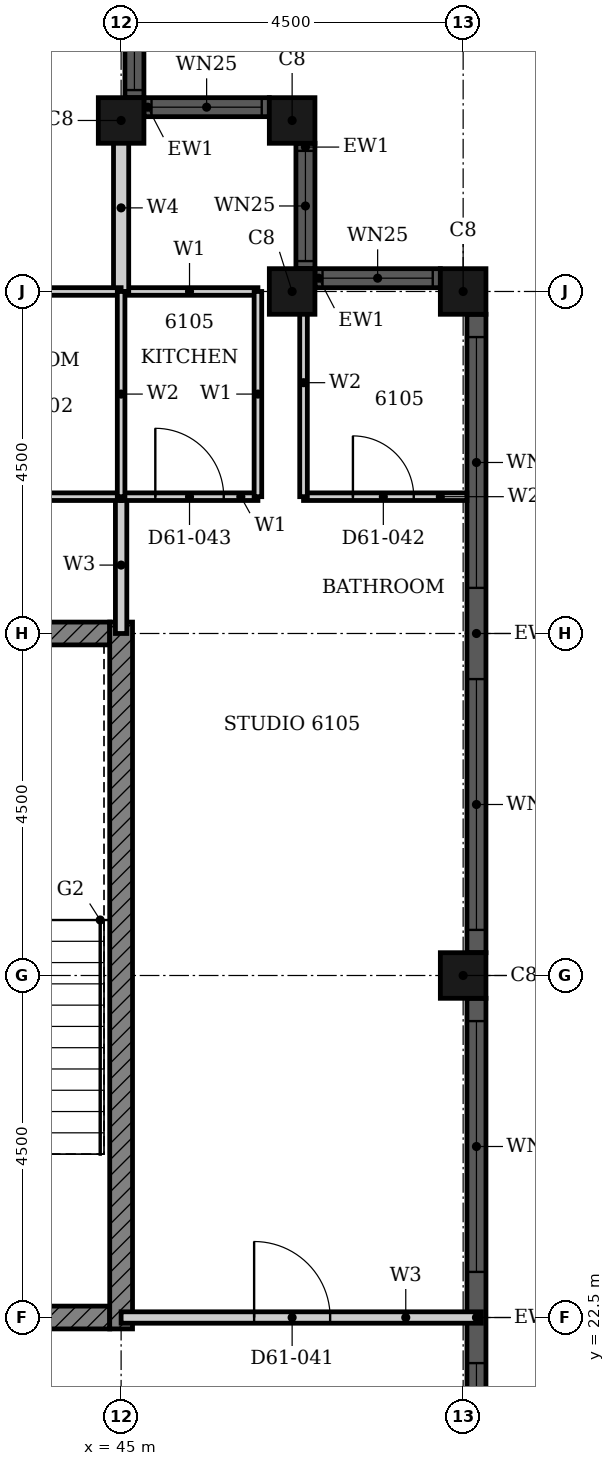
"""IFC4 building model, lengths in metres.
Left out: names, types, materials, properties, quantities, classifications, styles, units other than length and angle.
Written with IfcOpenShell. Run it as: python <this file> out.ifc"""

import sys

from ifc_helpers import new_model, si_unit, direction, frame, frame_2d, origin, origin_2d, place, context, subcontext, project, spatial, rectangle, hollow_rectangle, extrude, element, fill, save


model = new_model("IFC4")
c1 = context("Model", 3, precision=1e-05, world=origin(), true_north=direction((0.0, 1.0)))
c2 = subcontext(c1, "Body", "Model", "MODEL_VIEW")
j1 = project(units=[si_unit("LENGTHUNIT", "METRE"), si_unit("PLANEANGLEUNIT", "RADIAN")], contexts=[c1])
p1 = place(None, origin())
s1 = spatial("IfcSite", under=j1, at=p1, CompositionType="ELEMENT")
p2 = place(p1, origin())
s2 = spatial("IfcBuilding", under=s1, at=p2, CompositionType="ELEMENT")
p3 = place(p2, frame((0.0, 0.0, 241.6)))
s3 = spatial("IfcBuildingStorey", under=s2, at=p3, CompositionType="ELEMENT", Elevation=241.6)
for number, where, z_axis, x_axis in (
    (1, (49.5, 27.0, 0.0), (0.0, 0.0, 1.0), (1.0, 0.0, 0.0)),
    (2, (49.5, 36.0, 0.0), (0.0, 0.0, 1.0), (1.0, 0.0, 0.0)),
    (3, (47.25, 36.0, 0.0), (0.0, 0.0, 1.0), (1.0, 0.0, 0.0)),
    (4, (47.25, 38.25, 0.0), (0.0, 0.0, 1.0), (1.0, 0.0, 0.0)),
    (5, (45.0, 38.25, 0.0), (0.0, 0.0, 1.0), (1.0, 0.0, 0.0)),
):
    element("IfcColumn", number, at=place(p3, frame(where, z_axis=z_axis, x_axis=x_axis)), inside=s3, PredefinedType="COLUMN", context=c2, shape_type="SweptSolid", body=[
        extrude(hollow_rectangle(XDim=0.6, YDim=0.6, WallThickness=0.02, at=origin_2d()), origin(), (0.0, 0.0, 1.0), 3.7),
    ])
p4 = place(p3, frame((49.675, 18.3, 0.0), z_axis=(0.0, 0.0, 1.0), x_axis=(0.0, 1.0, 0.0)))
e6 = element("IfcWall", 6, at=p4, inside=s3, PredefinedType="SOLIDWALL", context=c2, shape_type="SweptSolid", body=[
    extrude(rectangle(XDim=8.4, YDim=0.25, at=frame_2d((4.2, 0.0))), origin(), (0.0, 0.0, 1.0), 3.7),
])
p5 = place(p4, frame((0.3, 0.0, 0.45)))
e7 = element("IfcOpeningElement", 7, at=p5, cuts=e6, PredefinedType="OPENING", context=c2, shape_type="SweptSolid", body=[
    extrude(rectangle(XDim=3.3, YDim=2.3, at=frame_2d((1.65, 1.15))), frame((0.0, 0.135, 0.0), z_axis=(0.0, -1.0, 0.0), x_axis=(1.0, 0.0, 0.0)), (0.0, 0.0, 1.0), 0.27),
])
p6 = place(p4, frame((4.8, 0.0, 0.45)))
e8 = element("IfcOpeningElement", 8, at=p6, cuts=e6, PredefinedType="OPENING", context=c2, shape_type="SweptSolid", body=[
    extrude(rectangle(XDim=3.3, YDim=2.3, at=frame_2d((1.65, 1.15))), frame((0.0, 0.135, 0.0), z_axis=(0.0, -1.0, 0.0), x_axis=(1.0, 0.0, 0.0)), (0.0, 0.0, 1.0), 0.27),
])
p7 = place(p3, frame((49.675, 27.3, 0.0), z_axis=(0.0, 0.0, 1.0), x_axis=(0.0, 1.0, 0.0)))
e9 = element("IfcWall", 9, at=p7, inside=s3, PredefinedType="SOLIDWALL", context=c2, shape_type="SweptSolid", body=[
    extrude(rectangle(XDim=8.4, YDim=0.25, at=frame_2d((4.2, 0.0))), origin(), (0.0, 0.0, 1.0), 3.7),
])
p8 = place(p7, frame((0.3, 0.0, 0.45)))
e10 = element("IfcOpeningElement", 10, at=p8, cuts=e9, PredefinedType="OPENING", context=c2, shape_type="SweptSolid", body=[
    extrude(rectangle(XDim=3.3, YDim=2.3, at=frame_2d((1.65, 1.15))), frame((0.0, 0.135, 0.0), z_axis=(0.0, -1.0, 0.0), x_axis=(1.0, 0.0, 0.0)), (0.0, 0.0, 1.0), 0.27),
])
p9 = place(p7, frame((4.8, 0.0, 0.45)))
e11 = element("IfcOpeningElement", 11, at=p9, cuts=e9, PredefinedType="OPENING", context=c2, shape_type="SweptSolid", body=[
    extrude(rectangle(XDim=3.3, YDim=2.3, at=frame_2d((1.65, 1.15))), frame((0.0, 0.135, 0.0), z_axis=(0.0, -1.0, 0.0), x_axis=(1.0, 0.0, 0.0)), (0.0, 0.0, 1.0), 0.27),
])
p10 = place(p3, frame((49.2, 36.175, 0.0), z_axis=(0.0, 0.0, 1.0), x_axis=(-1.0, 0.0, 0.0)))
e12 = element("IfcWall", 12, at=p10, inside=s3, PredefinedType="SOLIDWALL", context=c2, shape_type="SweptSolid", body=[
    extrude(rectangle(XDim=1.65, YDim=0.25, at=frame_2d((0.825, 0.0))), origin(), (0.0, 0.0, 1.0), 3.7),
])
p11 = place(p10, frame((0.1, 0.0, 0.9)))
e13 = element("IfcOpeningElement", 13, at=p11, cuts=e12, PredefinedType="OPENING", context=c2, shape_type="SweptSolid", body=[
    extrude(rectangle(XDim=1.45, YDim=1.85, at=frame_2d((0.725, 0.925))), frame((0.0, 0.135, 0.0), z_axis=(0.0, -1.0, 0.0), x_axis=(1.0, 0.0, 0.0)), (0.0, 0.0, 1.0), 0.27),
])
p12 = place(p3, frame((47.425, 36.3, 0.0), z_axis=(0.0, 0.0, 1.0), x_axis=(0.0, 1.0, 0.0)))
e14 = element("IfcWall", 14, at=p12, inside=s3, PredefinedType="SOLIDWALL", context=c2, shape_type="SweptSolid", body=[
    extrude(rectangle(XDim=1.65, YDim=0.25, at=frame_2d((0.825, 0.0))), origin(), (0.0, 0.0, 1.0), 3.7),
])
p13 = place(p12, frame((0.1, 0.0, 0.9)))
e15 = element("IfcOpeningElement", 15, at=p13, cuts=e14, PredefinedType="OPENING", context=c2, shape_type="SweptSolid", body=[
    extrude(rectangle(XDim=1.45, YDim=1.85, at=frame_2d((0.725, 0.925))), frame((0.0, 0.135, 0.0), z_axis=(0.0, -1.0, 0.0), x_axis=(1.0, 0.0, 0.0)), (0.0, 0.0, 1.0), 0.27),
])
p14 = place(p3, frame((46.95, 38.425, 0.0), z_axis=(0.0, 0.0, 1.0), x_axis=(-1.0, 0.0, 0.0)))
e16 = element("IfcWall", 16, at=p14, inside=s3, PredefinedType="SOLIDWALL", context=c2, shape_type="SweptSolid", body=[
    extrude(rectangle(XDim=1.65, YDim=0.25, at=frame_2d((0.825, 0.0))), origin(), (0.0, 0.0, 1.0), 3.7),
])
p15 = place(p14, frame((0.1, 0.0, 0.9)))
e17 = element("IfcOpeningElement", 17, at=p15, cuts=e16, PredefinedType="OPENING", context=c2, shape_type="SweptSolid", body=[
    extrude(rectangle(XDim=1.45, YDim=1.85, at=frame_2d((0.725, 0.925))), frame((0.0, 0.135, 0.0), z_axis=(0.0, -1.0, 0.0), x_axis=(1.0, 0.0, 0.0)), (0.0, 0.0, 1.0), 0.27),
])
p16 = place(p3, frame((45.175, 38.55, 0.0), z_axis=(0.0, 0.0, 1.0), x_axis=(0.0, 1.0, 0.0)))
e18 = element("IfcWall", 18, at=p16, inside=s3, PredefinedType="SOLIDWALL", context=c2, shape_type="SweptSolid", body=[
    extrude(rectangle(XDim=1.65, YDim=0.25, at=frame_2d((0.825, 0.0))), origin(), (0.0, 0.0, 1.0), 3.7),
])
p17 = place(p16, frame((0.1, 0.0, 0.9)))
e19 = element("IfcOpeningElement", 19, at=p17, cuts=e18, PredefinedType="OPENING", context=c2, shape_type="SweptSolid", body=[
    extrude(rectangle(XDim=1.45, YDim=1.85, at=frame_2d((0.725, 0.925))), frame((0.0, 0.135, 0.0), z_axis=(0.0, -1.0, 0.0), x_axis=(1.0, 0.0, 0.0)), (0.0, 0.0, 1.0), 0.27),
])
p18 = place(p3, frame((30.339, 22.5, 0.0), z_axis=(0.0, 0.0, 1.0), x_axis=(1.0, 0.0, 0.0)))
e20 = element("IfcWall", 20, at=p18, inside=s3, PredefinedType="SHEAR", context=c2, shape_type="SweptSolid", body=[
    extrude(rectangle(XDim=14.511, YDim=0.3, at=frame_2d((7.255, 0.0))), origin(), (0.0, 0.0, 1.0), 3.4),
])
p19 = place(p18, frame((7.975, 0.0, 0.0)))
e21 = element("IfcOpeningElement", 21, at=p19, cuts=e20, PredefinedType="OPENING", context=c2, shape_type="SweptSolid", body=[
    extrude(rectangle(XDim=1.8, YDim=2.1, at=frame_2d((0.9, 1.05))), frame((0.0, 0.16, 0.0), z_axis=(0.0, -1.0, 0.0), x_axis=(1.0, 0.0, 0.0)), (0.0, 0.0, 1.0), 0.32),
])
p20 = place(p3, frame((40.625, 31.5, 0.0), z_axis=(0.0, 0.0, 1.0), x_axis=(1.0, 0.0, 0.0)))
e22 = element("IfcWall", 22, at=p20, inside=s3, PredefinedType="SHEAR", context=c2, shape_type="SweptSolid", body=[
    extrude(rectangle(XDim=4.225, YDim=0.3, at=frame_2d((2.113, 0.0))), origin(), (0.0, 0.0, 1.0), 3.4),
])
p21 = place(p3, frame((45.0, 22.35, 0.0), z_axis=(0.0, 0.0, 1.0), x_axis=(0.0, 1.0, 0.0)))
e23 = element("IfcWall", 23, at=p21, inside=s3, PredefinedType="SHEAR", context=c2, shape_type="SweptSolid", body=[
    extrude(rectangle(XDim=9.3, YDim=0.3, at=frame_2d((4.65, 0.0))), origin(), (0.0, 0.0, 1.0), 3.4),
])
p22 = place(p3, frame((45.0, 22.5, 0.0), z_axis=(0.0, 0.0, 1.0), x_axis=(1.0, 0.0, 0.0)))
e24 = element("IfcWall", 24, at=p22, inside=s3, PredefinedType="PARTITIONING", context=c2, shape_type="SweptSolid", body=[
    extrude(rectangle(XDim=4.74, YDim=0.15, at=frame_2d((2.37, 0.0))), origin(), (0.0, 0.0, 1.0), 3.4),
])
p23 = place(p22, frame((1.75, 0.0, 0.0)))
e25 = element("IfcOpeningElement", 25, at=p23, cuts=e24, PredefinedType="OPENING", context=c2, shape_type="SweptSolid", body=[
    extrude(rectangle(XDim=1.0, YDim=2.2, at=frame_2d((0.5, 1.1))), frame((0.0, 0.085, 0.0), z_axis=(0.0, -1.0, 0.0), x_axis=(1.0, 0.0, 0.0)), (0.0, 0.0, 1.0), 0.17),
])
p24 = place(p3, frame((45.0, 31.5, 0.0), z_axis=(0.0, 0.0, 1.0), x_axis=(0.0, 1.0, 0.0)))
e26 = element("IfcWall", 26, at=p24, inside=s3, PredefinedType="PARTITIONING", context=c2, shape_type="SweptSolid", body=[
    extrude(rectangle(XDim=1.8, YDim=0.15, at=frame_2d((0.9, 0.0))), origin(), (0.0, 0.0, 1.0), 3.4),
])
p25 = place(p3, frame((45.0, 33.3, 0.0), z_axis=(0.0, 0.0, 1.0), x_axis=(1.0, 0.0, 0.0)))
e27 = element("IfcWall", 27, at=p25, inside=s3, PredefinedType="PARTITIONING", context=c2, shape_type="SweptSolid", body=[
    extrude(rectangle(XDim=1.8, YDim=0.1, at=frame_2d((0.9, 0.0))), origin(), (0.0, 0.0, 1.0), 3.4),
])
p26 = place(p25, frame((0.45, 0.0, 0.0)))
e28 = element("IfcOpeningElement", 28, at=p26, cuts=e27, PredefinedType="OPENING", context=c2, shape_type="SweptSolid", body=[
    extrude(rectangle(XDim=0.9, YDim=2.1, at=frame_2d((0.45, 1.05))), frame((0.0, 0.06, 0.0), z_axis=(0.0, -1.0, 0.0), x_axis=(1.0, 0.0, 0.0)), (0.0, 0.0, 1.0), 0.12),
])
p27 = place(p3, frame((45.0, 36.0, 0.0), z_axis=(0.0, 0.0, 1.0), x_axis=(1.0, 0.0, 0.0)))
e29 = element("IfcWall", 29, at=p27, inside=s3, PredefinedType="PARTITIONING", context=c2, shape_type="SweptSolid", body=[
    extrude(rectangle(XDim=1.8, YDim=0.1, at=frame_2d((0.9, 0.0))), origin(), (0.0, 0.0, 1.0), 3.4),
])
p28 = place(p3, frame((46.8, 33.3, 0.0), z_axis=(0.0, 0.0, 1.0), x_axis=(0.0, 1.0, 0.0)))
e30 = element("IfcWall", 30, at=p28, inside=s3, PredefinedType="PARTITIONING", context=c2, shape_type="SweptSolid", body=[
    extrude(rectangle(XDim=2.7, YDim=0.1, at=frame_2d((1.35, 0.0))), origin(), (0.0, 0.0, 1.0), 3.4),
])
p29 = place(p3, frame((45.0, 36.0, 0.0), z_axis=(0.0, 0.0, 1.0), x_axis=(0.0, 1.0, 0.0)))
e31 = element("IfcWall", 31, at=p29, inside=s3, PredefinedType="PARTITIONING", context=c2, shape_type="SweptSolid", body=[
    extrude(rectangle(XDim=2.2, YDim=0.2, at=frame_2d((1.1, 0.0))), origin(), (0.0, 0.0, 1.0), 3.4),
])
p30 = place(p3, frame((42.0, 33.3, 0.0), z_axis=(0.0, 0.0, 1.0), x_axis=(1.0, 0.0, 0.0)))
e32 = element("IfcWall", 32, at=p30, inside=s3, PredefinedType="PARTITIONING", context=c2, shape_type="SweptSolid", body=[
    extrude(rectangle(XDim=3.0, YDim=0.1, at=frame_2d((1.5, 0.0))), origin(), (0.0, 0.0, 1.0), 3.4),
])
p31 = place(p3, frame((47.4, 33.3, 0.0), z_axis=(0.0, 0.0, 1.0), x_axis=(1.0, 0.0, 0.0)))
e33 = element("IfcWall", 33, at=p31, inside=s3, PredefinedType="PARTITIONING", context=c2, shape_type="SweptSolid", body=[
    extrude(rectangle(XDim=2.15, YDim=0.1, at=frame_2d((1.075, 0.0))), origin(), (0.0, 0.0, 1.0), 3.4),
])
p32 = place(p31, frame((0.65, 0.0, 0.0)))
e34 = element("IfcOpeningElement", 34, at=p32, cuts=e33, PredefinedType="OPENING", context=c2, shape_type="SweptSolid", body=[
    extrude(rectangle(XDim=0.8, YDim=2.1, at=frame_2d((0.4, 1.05))), frame((0.0, 0.06, 0.0), z_axis=(0.0, -1.0, 0.0), x_axis=(1.0, 0.0, 0.0)), (0.0, 0.0, 1.0), 0.12),
])
p33 = place(p3, frame((42.0, 36.0, 0.0), z_axis=(0.0, 0.0, 1.0), x_axis=(1.0, 0.0, 0.0)))
e35 = element("IfcWall", 35, at=p33, inside=s3, PredefinedType="PARTITIONING", context=c2, shape_type="SweptSolid", body=[
    extrude(rectangle(XDim=3.0, YDim=0.1, at=frame_2d((1.5, 0.0))), origin(), (0.0, 0.0, 1.0), 3.4),
])
p34 = place(p3, frame((45.0, 33.3, 0.0), z_axis=(0.0, 0.0, 1.0), x_axis=(0.0, 1.0, 0.0)))
e36 = element("IfcWall", 36, at=p34, inside=s3, PredefinedType="PARTITIONING", context=c2, shape_type="SweptSolid", body=[
    extrude(rectangle(XDim=2.7, YDim=0.1, at=frame_2d((1.35, 0.0))), origin(), (0.0, 0.0, 1.0), 3.4),
])
p35 = place(p3, frame((47.4, 33.3, 0.0), z_axis=(0.0, 0.0, 1.0), x_axis=(0.0, 1.0, 0.0)))
e37 = element("IfcWall", 37, at=p35, inside=s3, PredefinedType="PARTITIONING", context=c2, shape_type="SweptSolid", body=[
    extrude(rectangle(XDim=3.0, YDim=0.1, at=frame_2d((1.5, 0.0))), origin(), (0.0, 0.0, 1.0), 3.4),
])
p36 = place(p5, origin())
e38 = element("IfcWindow", 38, at=p36, inside=s3, PartitioningType="SINGLE_PANEL", PredefinedType="WINDOW", context=c2, shape_type="SweptSolid", body=[
    extrude(rectangle(XDim=3.3, YDim=2.3, at=frame_2d((1.65, 1.15))), frame((0.0, 0.03, 0.0), z_axis=(0.0, -1.0, 0.0), x_axis=(1.0, 0.0, 0.0)), (0.0, 0.0, 1.0), 0.06),
])
fill(e7, e38)
p37 = place(p6, origin())
e39 = element("IfcWindow", 39, at=p37, inside=s3, PartitioningType="SINGLE_PANEL", PredefinedType="WINDOW", context=c2, shape_type="SweptSolid", body=[
    extrude(rectangle(XDim=3.3, YDim=2.3, at=frame_2d((1.65, 1.15))), frame((0.0, 0.03, 0.0), z_axis=(0.0, -1.0, 0.0), x_axis=(1.0, 0.0, 0.0)), (0.0, 0.0, 1.0), 0.06),
])
fill(e8, e39)
p38 = place(p8, origin())
e40 = element("IfcWindow", 40, at=p38, inside=s3, PartitioningType="SINGLE_PANEL", PredefinedType="WINDOW", context=c2, shape_type="SweptSolid", body=[
    extrude(rectangle(XDim=3.3, YDim=2.3, at=frame_2d((1.65, 1.15))), frame((0.0, 0.03, 0.0), z_axis=(0.0, -1.0, 0.0), x_axis=(1.0, 0.0, 0.0)), (0.0, 0.0, 1.0), 0.06),
])
fill(e10, e40)
p39 = place(p9, origin())
e41 = element("IfcWindow", 41, at=p39, inside=s3, PartitioningType="SINGLE_PANEL", PredefinedType="WINDOW", context=c2, shape_type="SweptSolid", body=[
    extrude(rectangle(XDim=3.3, YDim=2.3, at=frame_2d((1.65, 1.15))), frame((0.0, 0.03, 0.0), z_axis=(0.0, -1.0, 0.0), x_axis=(1.0, 0.0, 0.0)), (0.0, 0.0, 1.0), 0.06),
])
fill(e11, e41)
p40 = place(p11, origin())
e42 = element("IfcWindow", 42, at=p40, inside=s3, PartitioningType="SINGLE_PANEL", PredefinedType="WINDOW", context=c2, shape_type="SweptSolid", body=[
    extrude(rectangle(XDim=1.45, YDim=1.85, at=frame_2d((0.725, 0.925))), frame((0.0, 0.03, 0.0), z_axis=(0.0, -1.0, 0.0), x_axis=(1.0, 0.0, 0.0)), (0.0, 0.0, 1.0), 0.06),
])
fill(e13, e42)
p41 = place(p13, origin())
e43 = element("IfcWindow", 43, at=p41, inside=s3, PartitioningType="SINGLE_PANEL", PredefinedType="WINDOW", context=c2, shape_type="SweptSolid", body=[
    extrude(rectangle(XDim=1.45, YDim=1.85, at=frame_2d((0.725, 0.925))), frame((0.0, 0.03, 0.0), z_axis=(0.0, -1.0, 0.0), x_axis=(1.0, 0.0, 0.0)), (0.0, 0.0, 1.0), 0.06),
])
fill(e15, e43)
p42 = place(p15, origin())
e44 = element("IfcWindow", 44, at=p42, inside=s3, PartitioningType="SINGLE_PANEL", PredefinedType="WINDOW", context=c2, shape_type="SweptSolid", body=[
    extrude(rectangle(XDim=1.45, YDim=1.85, at=frame_2d((0.725, 0.925))), frame((0.0, 0.03, 0.0), z_axis=(0.0, -1.0, 0.0), x_axis=(1.0, 0.0, 0.0)), (0.0, 0.0, 1.0), 0.06),
])
fill(e17, e44)
p43 = place(p17, origin())
e45 = element("IfcWindow", 45, at=p43, inside=s3, PartitioningType="SINGLE_PANEL", PredefinedType="WINDOW", context=c2, shape_type="SweptSolid", body=[
    extrude(rectangle(XDim=1.45, YDim=1.85, at=frame_2d((0.725, 0.925))), frame((0.0, 0.03, 0.0), z_axis=(0.0, -1.0, 0.0), x_axis=(1.0, 0.0, 0.0)), (0.0, 0.0, 1.0), 0.06),
])
fill(e19, e45)
p44 = place(p23, origin())
e46 = element("IfcDoor", 46, at=p44, inside=s3, OperationType="SINGLE_SWING_RIGHT", PredefinedType="DOOR", context=c2, shape_type="SweptSolid", body=[
    extrude(rectangle(XDim=1.0, YDim=2.2, at=frame_2d((0.5, 1.1))), frame((0.0, 0.025, 0.0), z_axis=(0.0, -1.0, 0.0), x_axis=(1.0, 0.0, 0.0)), (0.0, 0.0, 1.0), 0.05),
])
fill(e25, e46)
p45 = place(p32, origin())
e47 = element("IfcDoor", 47, at=p45, inside=s3, OperationType="SINGLE_SWING_RIGHT", PredefinedType="DOOR", context=c2, shape_type="SweptSolid", body=[
    extrude(rectangle(XDim=0.8, YDim=2.1, at=frame_2d((0.4, 1.05))), frame((0.0, 0.025, 0.0), z_axis=(0.0, -1.0, 0.0), x_axis=(1.0, 0.0, 0.0)), (0.0, 0.0, 1.0), 0.05),
])
fill(e34, e47)
p46 = place(p26, origin())
e48 = element("IfcDoor", 48, at=p46, inside=s3, OperationType="SINGLE_SWING_LEFT", PredefinedType="DOOR", context=c2, shape_type="SweptSolid", body=[
    extrude(rectangle(XDim=0.9, YDim=2.1, at=frame_2d((0.45, 1.05))), frame((0.0, 0.025, 0.0), z_axis=(0.0, -1.0, 0.0), x_axis=(1.0, 0.0, 0.0)), (0.0, 0.0, 1.0), 0.05),
])
fill(e28, e48)
save(model, sys.argv[1])
